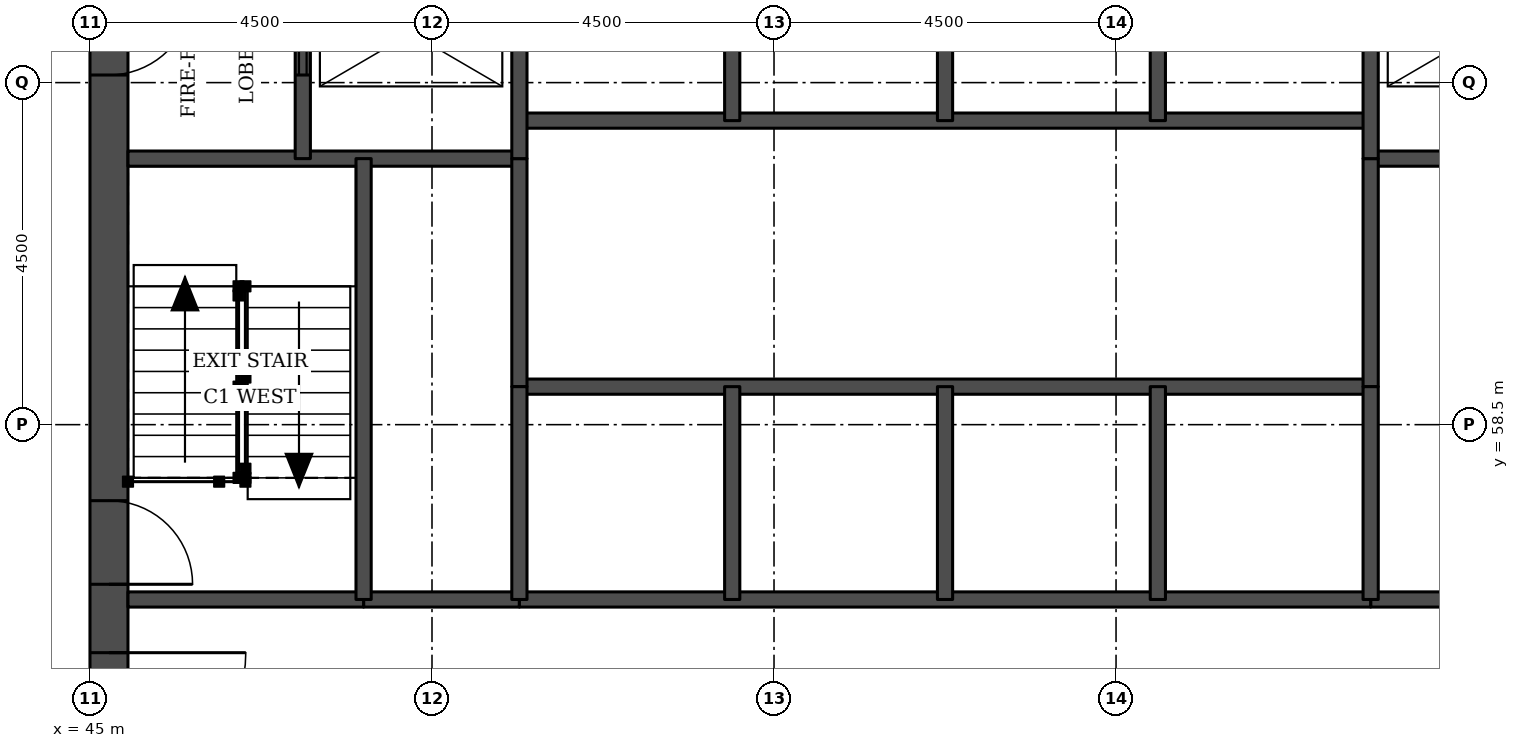
"""IFC4 building model, lengths in metres.
Left out: names, types, materials, properties, quantities, classifications, styles, units other than length and angle.
Written with IfcOpenShell. Run it as: python <this file> out.ifc"""

import sys

from ifc_helpers import new_model, si_unit, direction, frame, frame_2d, origin, place, context, subcontext, project, spatial, rectangle, extrude, element, fill, save


model = new_model("IFC4")
c1 = context("Model", 3, precision=1e-05, world=origin(), true_north=direction((0.0, 1.0)))
c2 = subcontext(c1, "Body", "Model", "MODEL_VIEW")
j1 = project(units=[si_unit("LENGTHUNIT", "METRE"), si_unit("PLANEANGLEUNIT", "RADIAN")], contexts=[c1])
p1 = place(None, origin())
s1 = spatial("IfcSite", under=j1, at=p1, CompositionType="ELEMENT")
p2 = place(p1, origin())
s2 = spatial("IfcBuilding", under=s1, at=p2, CompositionType="ELEMENT")
p3 = place(p2, frame((0.0, 0.0, 59.4)))
s3 = spatial("IfcBuildingStorey", under=s2, at=p3, CompositionType="ELEMENT", Elevation=59.4)
p4 = place(p3, frame((45.25, 49.5, 0.0), z_axis=(0.0, 0.0, 1.0), x_axis=(0.0, 1.0, 0.0)))
e1 = element("IfcWall", 1, at=p4, inside=s3, PredefinedType="SHEAR", context=c2, shape_type="SweptSolid", body=[
    extrude(rectangle(XDim=22.5, YDim=0.5, at=frame_2d((11.25, 0.0))), origin(), (0.0, 0.0, 1.0), 3.3),
])
p5 = place(p4, frame((4.2, 0.0, 0.0)))
e2 = element("IfcOpeningElement", 2, at=p5, cuts=e1, PredefinedType="OPENING", context=c2, shape_type="SweptSolid", body=[
    extrude(rectangle(XDim=1.8, YDim=2.1, at=frame_2d((0.9, 1.05))), frame((0.0, 0.26, 0.0), z_axis=(0.0, -1.0, 0.0), x_axis=(1.0, 0.0, 0.0)), (0.0, 0.0, 1.0), 0.52),
])
p6 = place(p4, frame((6.9, 0.0, 0.0)))
e3 = element("IfcOpeningElement", 3, at=p6, cuts=e1, PredefinedType="OPENING", context=c2, shape_type="SweptSolid", body=[
    extrude(rectangle(XDim=1.1, YDim=2.1, at=frame_2d((0.55, 1.05))), frame((0.0, 0.26, 0.0), z_axis=(0.0, -1.0, 0.0), x_axis=(1.0, 0.0, 0.0)), (0.0, 0.0, 1.0), 0.52),
])
p7 = place(p4, frame((13.6, 0.0, 0.0)))
e4 = element("IfcOpeningElement", 4, at=p7, cuts=e1, PredefinedType="OPENING", context=c2, shape_type="SweptSolid", body=[
    extrude(rectangle(XDim=1.1, YDim=2.1, at=frame_2d((0.55, 1.05))), frame((0.0, 0.26, 0.0), z_axis=(0.0, -1.0, 0.0), x_axis=(1.0, 0.0, 0.0)), (0.0, 0.0, 1.0), 0.52),
])
p8 = place(p4, frame((16.5, 0.0, 0.0)))
e5 = element("IfcOpeningElement", 5, at=p8, cuts=e1, PredefinedType="OPENING", context=c2, shape_type="SweptSolid", body=[
    extrude(rectangle(XDim=1.8, YDim=2.1, at=frame_2d((0.9, 1.05))), frame((0.0, 0.26, 0.0), z_axis=(0.0, -1.0, 0.0), x_axis=(1.0, 0.0, 0.0)), (0.0, 0.0, 1.0), 0.52),
])
for number, where, z_axis, x_axis in (
    (6, (48.6, 56.2, 0.0), (0.0, 0.0, 1.0), (1.0, 0.0, 0.0)),
    (7, (61.85, 56.2, 0.0), (0.0, 0.0, 1.0), (1.0, 0.0, 0.0)),
):
    element("IfcWall", number, at=place(p3, frame(where, z_axis=z_axis, x_axis=x_axis)), inside=s3, PredefinedType="SOLIDWALL", context=c2, shape_type="SweptSolid", body=[
        extrude(rectangle(XDim=2.05, YDim=0.2, at=frame_2d((1.025, 0.0))), origin(), (0.0, 0.0, 1.0), 3.08),
    ])
p9 = place(p3, frame((45.5, 56.2, 0.0), z_axis=(0.0, 0.0, 1.0), x_axis=(1.0, 0.0, 0.0)))
e8 = element("IfcWall", 8, at=p9, inside=s3, PredefinedType="SOLIDWALL", context=c2, shape_type="SweptSolid", body=[
    extrude(rectangle(XDim=3.1, YDim=0.2, at=frame_2d((1.55, 0.0))), origin(), (0.0, 0.0, 1.0), 3.08),
])
p10 = place(p3, frame((50.65, 56.2, 0.0), z_axis=(0.0, 0.0, 1.0), x_axis=(1.0, 0.0, 0.0)))
e9 = element("IfcWall", 9, at=p10, inside=s3, PredefinedType="SOLIDWALL", context=c2, shape_type="SweptSolid", body=[
    extrude(rectangle(XDim=11.2, YDim=0.2, at=frame_2d((5.6, 0.0))), origin(), (0.0, 0.0, 1.0), 3.08),
])
p11 = place(p3, frame((50.65, 59.0, 0.0), z_axis=(0.0, 0.0, 1.0), x_axis=(1.0, 0.0, 0.0)))
e10 = element("IfcWall", 10, at=p11, inside=s3, PredefinedType="SOLIDWALL", context=c2, shape_type="SweptSolid", body=[
    extrude(rectangle(XDim=11.2, YDim=0.2, at=frame_2d((5.6, 0.0))), origin(), (0.0, 0.0, 1.0), 3.3),
])
for number, where, z_axis, x_axis in (
    (11, (45.5, 62.0, 0.0), (0.0, 0.0, 1.0), (1.0, 0.0, 0.0)),
    (12, (61.85, 62.0, 0.0), (0.0, 0.0, 1.0), (1.0, 0.0, 0.0)),
):
    element("IfcWall", number, at=place(p3, frame(where, z_axis=z_axis, x_axis=x_axis)), inside=s3, PredefinedType="SOLIDWALL", context=c2, shape_type="SweptSolid", body=[
        extrude(rectangle(XDim=5.15, YDim=0.2, at=frame_2d((2.575, 0.0))), origin(), (0.0, 0.0, 1.0), 3.08),
    ])
p12 = place(p3, frame((50.65, 62.5, 0.0), z_axis=(0.0, 0.0, 1.0), x_axis=(1.0, 0.0, 0.0)))
e13 = element("IfcWall", 13, at=p12, inside=s3, PredefinedType="SOLIDWALL", context=c2, shape_type="SweptSolid", body=[
    extrude(rectangle(XDim=11.2, YDim=0.2, at=frame_2d((5.6, 0.0))), origin(), (0.0, 0.0, 1.0), 3.3),
])
p13 = place(p3, frame((47.8, 62.0, 0.0), z_axis=(0.0, 0.0, 1.0), x_axis=(0.0, 1.0, 0.0)))
e14 = element("IfcWall", 14, at=p13, inside=s3, PredefinedType="SOLIDWALL", context=c2, shape_type="SweptSolid", body=[
    extrude(rectangle(XDim=3.3, YDim=0.2, at=frame_2d((1.65, 0.0))), origin(), (0.0, 0.0, 1.0), 3.08),
])
p14 = place(p13, frame((1.1, 0.0, 0.0)))
e15 = element("IfcOpeningElement", 15, at=p14, cuts=e14, PredefinedType="OPENING", context=c2, shape_type="SweptSolid", body=[
    extrude(rectangle(XDim=1.1, YDim=2.1, at=frame_2d((0.55, 1.05))), frame((0.0, 0.11, 0.0), z_axis=(0.0, -1.0, 0.0), x_axis=(1.0, 0.0, 0.0)), (0.0, 0.0, 1.0), 0.22),
])
p15 = place(p3, frame((48.6, 56.2, 0.0), z_axis=(0.0, 0.0, 1.0), x_axis=(0.0, 1.0, 0.0)))
e16 = element("IfcWall", 16, at=p15, inside=s3, PredefinedType="SOLIDWALL", context=c2, shape_type="SweptSolid", body=[
    extrude(rectangle(XDim=5.8, YDim=0.2, at=frame_2d((2.9, 0.0))), origin(), (0.0, 0.0, 1.0), 3.08),
])
p16 = place(p3, frame((50.65, 59.0, 0.0), z_axis=(0.0, 0.0, 1.0), x_axis=(0.0, 1.0, 0.0)))
e17 = element("IfcWall", 17, at=p16, inside=s3, PredefinedType="SOLIDWALL", context=c2, shape_type="SweptSolid", body=[
    extrude(rectangle(XDim=3.0, YDim=0.2, at=frame_2d((1.5, 0.0))), origin(), (0.0, 0.0, 1.0), 3.3),
])
p17 = place(p3, frame((50.65, 56.2, 0.0), z_axis=(0.0, 0.0, 1.0), x_axis=(0.0, 1.0, 0.0)))
e18 = element("IfcWall", 18, at=p17, inside=s3, PredefinedType="SOLIDWALL", context=c2, shape_type="SweptSolid", body=[
    extrude(rectangle(XDim=2.8, YDim=0.2, at=frame_2d((1.4, 0.0))), origin(), (0.0, 0.0, 1.0), 3.08),
])
p18 = place(p3, frame((50.65, 62.0, 0.0), z_axis=(0.0, 0.0, 1.0), x_axis=(0.0, 1.0, 0.0)))
e19 = element("IfcWall", 19, at=p18, inside=s3, PredefinedType="SOLIDWALL", context=c2, shape_type="SweptSolid", body=[
    extrude(rectangle(XDim=3.3, YDim=0.2, at=frame_2d((1.65, 0.0))), origin(), (0.0, 0.0, 1.0), 3.08),
])
for number, where, z_axis, x_axis in (
    (20, (53.45, 56.2, 0.0), (0.0, 0.0, 1.0), (0.0, 1.0, 0.0)),
    (21, (53.45, 62.5, 0.0), (0.0, 0.0, 1.0), (0.0, 1.0, 0.0)),
    (22, (56.25, 56.2, 0.0), (0.0, 0.0, 1.0), (0.0, 1.0, 0.0)),
    (23, (56.25, 62.5, 0.0), (0.0, 0.0, 1.0), (0.0, 1.0, 0.0)),
    (24, (59.05, 56.2, 0.0), (0.0, 0.0, 1.0), (0.0, 1.0, 0.0)),
    (25, (59.05, 62.5, 0.0), (0.0, 0.0, 1.0), (0.0, 1.0, 0.0)),
):
    element("IfcWall", number, at=place(p3, frame(where, z_axis=z_axis, x_axis=x_axis)), inside=s3, PredefinedType="SOLIDWALL", context=c2, shape_type="SweptSolid", body=[
        extrude(rectangle(XDim=2.8, YDim=0.2, at=frame_2d((1.4, 0.0))), origin(), (0.0, 0.0, 1.0), 3.08),
    ])
p19 = place(p3, frame((61.85, 59.0, 0.0), z_axis=(0.0, 0.0, 1.0), x_axis=(0.0, 1.0, 0.0)))
e26 = element("IfcWall", 26, at=p19, inside=s3, PredefinedType="SOLIDWALL", context=c2, shape_type="SweptSolid", body=[
    extrude(rectangle(XDim=3.0, YDim=0.2, at=frame_2d((1.5, 0.0))), origin(), (0.0, 0.0, 1.0), 3.3),
])
p20 = place(p3, frame((61.85, 56.2, 0.0), z_axis=(0.0, 0.0, 1.0), x_axis=(0.0, 1.0, 0.0)))
e27 = element("IfcWall", 27, at=p20, inside=s3, PredefinedType="SOLIDWALL", context=c2, shape_type="SweptSolid", body=[
    extrude(rectangle(XDim=2.8, YDim=0.2, at=frame_2d((1.4, 0.0))), origin(), (0.0, 0.0, 1.0), 3.08),
])
p21 = place(p3, frame((61.85, 62.0, 0.0), z_axis=(0.0, 0.0, 1.0), x_axis=(0.0, 1.0, 0.0)))
e28 = element("IfcWall", 28, at=p21, inside=s3, PredefinedType="SOLIDWALL", context=c2, shape_type="SweptSolid", body=[
    extrude(rectangle(XDim=3.3, YDim=0.2, at=frame_2d((1.65, 0.0))), origin(), (0.0, 0.0, 1.0), 3.08),
])
p22 = place(p14, origin())
e29 = element("IfcDoor", 29, at=p22, inside=s3, OperationType="DOUBLE_DOOR_SLIDING", PredefinedType="DOOR", context=c2, shape_type="SweptSolid", body=[
    extrude(rectangle(XDim=1.1, YDim=2.1, at=frame_2d((0.55, 1.05))), frame((0.0, 0.025, 0.0), z_axis=(0.0, -1.0, 0.0), x_axis=(1.0, 0.0, 0.0)), (0.0, 0.0, 1.0), 0.05),
])
fill(e15, e29)
p23 = place(p5, frame((1.8, 0.0, 0.0), z_axis=(0.0, 0.0, 1.0), x_axis=(-1.0, 0.0, 0.0)))
e30 = element("IfcDoor", 30, at=p23, inside=s3, OperationType="SINGLE_SWING_LEFT", PredefinedType="DOOR", context=c2, shape_type="SweptSolid", body=[
    extrude(rectangle(XDim=1.8, YDim=2.1, at=frame_2d((0.9, 1.05))), frame((0.0, 0.025, 0.0), z_axis=(0.0, -1.0, 0.0), x_axis=(1.0, 0.0, 0.0)), (0.0, 0.0, 1.0), 0.05),
])
fill(e2, e30)
p24 = place(p6, frame((1.1, 0.0, 0.0), z_axis=(0.0, 0.0, 1.0), x_axis=(-1.0, 0.0, 0.0)))
e31 = element("IfcDoor", 31, at=p24, inside=s3, OperationType="SINGLE_SWING_RIGHT", PredefinedType="DOOR", context=c2, shape_type="SweptSolid", body=[
    extrude(rectangle(XDim=1.1, YDim=2.1, at=frame_2d((0.55, 1.05))), frame((0.0, 0.025, 0.0), z_axis=(0.0, -1.0, 0.0), x_axis=(1.0, 0.0, 0.0)), (0.0, 0.0, 1.0), 0.05),
])
fill(e3, e31)
p25 = place(p7, frame((1.1, 0.0, 0.0), z_axis=(0.0, 0.0, 1.0), x_axis=(-1.0, 0.0, 0.0)))
e32 = element("IfcDoor", 32, at=p25, inside=s3, OperationType="SINGLE_SWING_LEFT", PredefinedType="DOOR", context=c2, shape_type="SweptSolid", body=[
    extrude(rectangle(XDim=1.1, YDim=2.1, at=frame_2d((0.55, 1.05))), frame((0.0, 0.025, 0.0), z_axis=(0.0, -1.0, 0.0), x_axis=(1.0, 0.0, 0.0)), (0.0, 0.0, 1.0), 0.05),
])
fill(e4, e32)
save(model, sys.argv[1])
